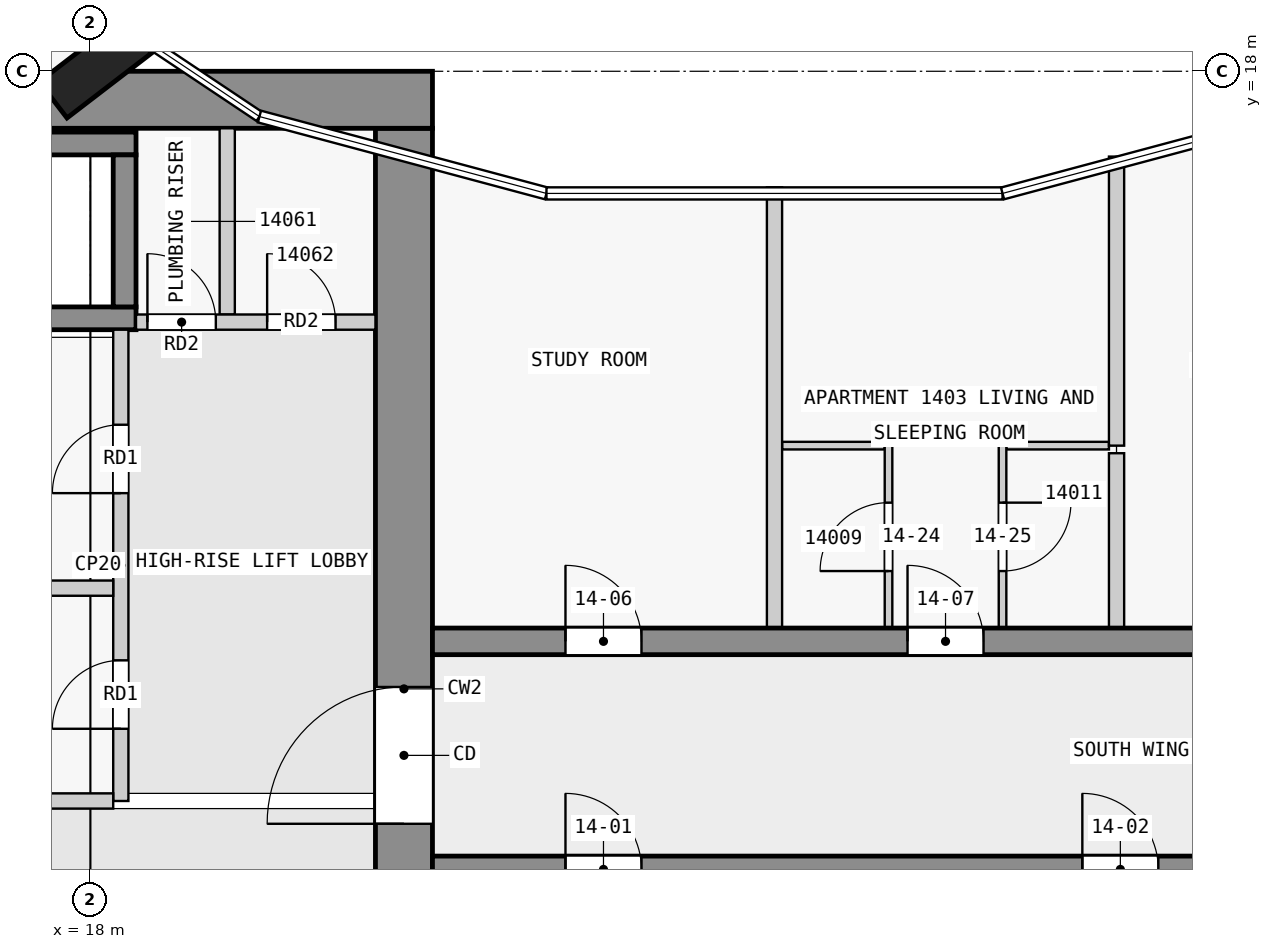
"""IFC4 building model, lengths in metres.
Left out: names, types, materials, properties, quantities, classifications, styles, units other than length and angle.
Written with IfcOpenShell. Run it as: python <this file> out.ifc"""

import sys

from ifc_helpers import new_model, si_unit, direction, frame, frame_2d, origin, origin_2d, place, context, subcontext, project, spatial, rectangle, extrude, element, fill, save


model = new_model("IFC4")
c1 = context("Model", 3, precision=1e-05, world=origin(), true_north=direction((0.0, 1.0)))
c2 = subcontext(c1, "Body", "Model", "MODEL_VIEW")
j1 = project(units=[si_unit("LENGTHUNIT", "METRE"), si_unit("PLANEANGLEUNIT", "RADIAN")], contexts=[c1])
p1 = place(None, origin())
s1 = spatial("IfcSite", under=j1, at=p1, CompositionType="ELEMENT")
p2 = place(p1, origin())
s2 = spatial("IfcBuilding", under=s1, at=p2, CompositionType="ELEMENT")
p3 = place(p2, frame((0.0, 0.0, 58.3)))
s3 = spatial("IfcBuildingStorey", under=s2, at=p3, CompositionType="ELEMENT", Elevation=58.3)
p4 = place(p3, frame((18.065, 18.05, 0.0), z_axis=(0.0, 0.0, 1.0), x_axis=(-0.608810846443, 0.793315418515, 0.0)))
e1 = element("IfcColumn", 1, at=p4, inside=s3, PredefinedType="COLUMN", context=c2, shape_type="SweptSolid", body=[
    extrude(rectangle(XDim=0.6, YDim=1.4, at=origin_2d()), origin(), (0.0, 0.0, 1.0), 3.5),
])
p5 = place(p3, frame((1.55, 17.625, 0.0), z_axis=(0.0, 0.0, 1.0), x_axis=(1.0, 0.0, 0.0)))
e2 = element("IfcWall", 2, at=p5, inside=s3, PredefinedType="SHEAR", context=c2, shape_type="SweptSolid", body=[
    extrude(rectangle(XDim=20.95, YDim=0.75, at=frame_2d((10.475, 0.0))), origin(), (0.0, 0.0, 1.0), 3.25),
])
p6 = place(p5, frame((6.55, 0.0, 0.0)))
e3 = element("IfcOpeningElement", 3, at=p6, cuts=e2, PredefinedType="OPENING", context=c2, shape_type="SweptSolid", body=[
    extrude(rectangle(XDim=1.8, YDim=2.1, at=frame_2d((0.9, 1.05))), frame((0.0, 0.385, 0.0), z_axis=(0.0, -1.0, 0.0), x_axis=(1.0, 0.0, 0.0)), (0.0, 0.0, 1.0), 0.77),
])
p7 = place(p3, frame((22.125, 2.5, 0.0), z_axis=(0.0, 0.0, 1.0), x_axis=(0.0, 1.0, 0.0)))
e4 = element("IfcWall", 4, at=p7, inside=s3, PredefinedType="SHEAR", context=c2, shape_type="SweptSolid", body=[
    extrude(rectangle(XDim=14.75, YDim=0.75, at=frame_2d((7.375, 0.0))), origin(), (0.0, 0.0, 1.0), 3.25),
])
p8 = place(p7, frame((5.6, 0.0, 0.0)))
e5 = element("IfcOpeningElement", 5, at=p8, cuts=e4, PredefinedType="OPENING", context=c2, shape_type="SweptSolid", body=[
    extrude(rectangle(XDim=1.8, YDim=2.1, at=frame_2d((0.9, 1.05))), frame((0.0, 0.385, 0.0), z_axis=(0.0, -1.0, 0.0), x_axis=(1.0, 0.0, 0.0)), (0.0, 0.0, 1.0), 0.77),
])
for number, where, z_axis, x_axis in (
    (6, (10.8, 17.05, 0.0), (0.0, 0.0, 1.0), (1.0, 0.0, 0.0)),
    (7, (10.8, 14.75, 0.0), (0.0, 0.0, 1.0), (1.0, 0.0, 0.0)),
):
    element("IfcWall", number, at=place(p3, frame(where, z_axis=z_axis, x_axis=x_axis)), inside=s3, PredefinedType="SHEAR", context=c2, shape_type="SweptSolid", body=[
        extrude(rectangle(XDim=7.8, YDim=0.3, at=frame_2d((3.9, 0.0))), origin(), (0.0, 0.0, 1.0), 3.25),
    ])
p9 = place(p3, frame((18.45, 14.9, 0.0), z_axis=(0.0, 0.0, 1.0), x_axis=(0.0, 1.0, 0.0)))
e8 = element("IfcWall", 8, at=p9, inside=s3, PredefinedType="SHEAR", context=c2, shape_type="SweptSolid", body=[
    extrude(rectangle(XDim=2.0, YDim=0.3, at=frame_2d((1.0, 0.0))), origin(), (0.0, 0.0, 1.0), 3.25),
])
p10 = place(p3, frame((22.5, 7.5, 0.0), z_axis=(0.0, 0.0, 1.0), x_axis=(1.0, 0.0, 0.0)))
e9 = element("IfcWall", 9, at=p10, inside=s3, PredefinedType="SHEAR", context=c2, shape_type="SweptSolid", body=[
    extrude(rectangle(XDim=22.5, YDim=0.35, at=frame_2d((11.25, 0.0))), origin(), (0.0, 0.0, 1.0), 3.25),
])
p11 = place(p10, frame((1.75, 0.0, 0.0)))
e10 = element("IfcOpeningElement", 10, at=p11, cuts=e9, PredefinedType="OPENING", context=c2, shape_type="SweptSolid", body=[
    extrude(rectangle(XDim=1.0, YDim=2.1, at=frame_2d((0.5, 1.05))), frame((0.0, 0.185, 0.0), z_axis=(0.0, -1.0, 0.0), x_axis=(1.0, 0.0, 0.0)), (0.0, 0.0, 1.0), 0.37),
])
p12 = place(p10, frame((8.55, 0.0, 0.0)))
e11 = element("IfcOpeningElement", 11, at=p12, cuts=e9, PredefinedType="OPENING", context=c2, shape_type="SweptSolid", body=[
    extrude(rectangle(XDim=1.0, YDim=2.1, at=frame_2d((0.5, 1.05))), frame((0.0, 0.185, 0.0), z_axis=(0.0, -1.0, 0.0), x_axis=(1.0, 0.0, 0.0)), (0.0, 0.0, 1.0), 0.37),
])
p13 = place(p10, frame((15.25, 0.0, 0.0)))
e12 = element("IfcOpeningElement", 12, at=p13, cuts=e9, PredefinedType="OPENING", context=c2, shape_type="SweptSolid", body=[
    extrude(rectangle(XDim=1.0, YDim=2.1, at=frame_2d((0.5, 1.05))), frame((0.0, 0.185, 0.0), z_axis=(0.0, -1.0, 0.0), x_axis=(1.0, 0.0, 0.0)), (0.0, 0.0, 1.0), 0.37),
])
p14 = place(p10, frame((18.75, 0.0, 0.0)))
e13 = element("IfcOpeningElement", 13, at=p14, cuts=e9, PredefinedType="OPENING", context=c2, shape_type="SweptSolid", body=[
    extrude(rectangle(XDim=0.9, YDim=2.1, at=frame_2d((0.45, 1.05))), frame((0.0, 0.185, 0.0), z_axis=(0.0, -1.0, 0.0), x_axis=(1.0, 0.0, 0.0)), (0.0, 0.0, 1.0), 0.37),
])
p15 = place(p10, frame((20.95, 0.0, 0.0)))
e14 = element("IfcOpeningElement", 14, at=p15, cuts=e9, PredefinedType="OPENING", context=c2, shape_type="SweptSolid", body=[
    extrude(rectangle(XDim=1.0, YDim=2.1, at=frame_2d((0.5, 1.05))), frame((0.0, 0.185, 0.0), z_axis=(0.0, -1.0, 0.0), x_axis=(1.0, 0.0, 0.0)), (0.0, 0.0, 1.0), 0.37),
])
p16 = place(p3, frame((22.5, 10.5, 0.0), z_axis=(0.0, 0.0, 1.0), x_axis=(1.0, 0.0, 0.0)))
e15 = element("IfcWall", 15, at=p16, inside=s3, PredefinedType="SHEAR", context=c2, shape_type="SweptSolid", body=[
    extrude(rectangle(XDim=22.5, YDim=0.35, at=frame_2d((11.25, 0.0))), origin(), (0.0, 0.0, 1.0), 3.25),
])
p17 = place(p16, frame((1.75, 0.0, 0.0)))
e16 = element("IfcOpeningElement", 16, at=p17, cuts=e15, PredefinedType="OPENING", context=c2, shape_type="SweptSolid", body=[
    extrude(rectangle(XDim=1.0, YDim=2.1, at=frame_2d((0.5, 1.05))), frame((0.0, 0.185, 0.0), z_axis=(0.0, -1.0, 0.0), x_axis=(1.0, 0.0, 0.0)), (0.0, 0.0, 1.0), 0.37),
])
p18 = place(p16, frame((6.25, 0.0, 0.0)))
e17 = element("IfcOpeningElement", 17, at=p18, cuts=e15, PredefinedType="OPENING", context=c2, shape_type="SweptSolid", body=[
    extrude(rectangle(XDim=1.0, YDim=2.1, at=frame_2d((0.5, 1.05))), frame((0.0, 0.185, 0.0), z_axis=(0.0, -1.0, 0.0), x_axis=(1.0, 0.0, 0.0)), (0.0, 0.0, 1.0), 0.37),
])
p19 = place(p16, frame((10.75, 0.0, 0.0)))
e18 = element("IfcOpeningElement", 18, at=p19, cuts=e15, PredefinedType="OPENING", context=c2, shape_type="SweptSolid", body=[
    extrude(rectangle(XDim=1.0, YDim=2.1, at=frame_2d((0.5, 1.05))), frame((0.0, 0.185, 0.0), z_axis=(0.0, -1.0, 0.0), x_axis=(1.0, 0.0, 0.0)), (0.0, 0.0, 1.0), 0.37),
])
p20 = place(p16, frame((16.85, 0.0, 0.0)))
e19 = element("IfcOpeningElement", 19, at=p20, cuts=e15, PredefinedType="OPENING", context=c2, shape_type="SweptSolid", body=[
    extrude(rectangle(XDim=1.0, YDim=2.1, at=frame_2d((0.5, 1.05))), frame((0.0, 0.185, 0.0), z_axis=(0.0, -1.0, 0.0), x_axis=(1.0, 0.0, 0.0)), (0.0, 0.0, 1.0), 0.37),
])
p21 = place(p3, frame((10.9, 8.4, 0.0), z_axis=(0.0, 0.0, 1.0), x_axis=(1.0, 0.0, 0.0)))
e20 = element("IfcWall", 20, at=p21, inside=s3, PredefinedType="PARTITIONING", context=c2, shape_type="SweptSolid", body=[
    extrude(rectangle(XDim=7.4, YDim=0.2, at=frame_2d((3.7, 0.0))), origin(), (0.0, 0.0, 1.0), 3.25),
])
p22 = place(p3, frame((18.4, 8.4, 0.0), z_axis=(0.0, 0.0, 1.0), x_axis=(0.0, 1.0, 0.0)))
e21 = element("IfcWall", 21, at=p22, inside=s3, PredefinedType="PARTITIONING", context=c2, shape_type="SweptSolid", body=[
    extrude(rectangle(XDim=6.2, YDim=0.2, at=frame_2d((3.1, 0.0))), origin(), (0.0, 0.0, 1.0), 3.25),
])
p23 = place(p22, frame((0.95, 0.0, 0.0)))
e22 = element("IfcOpeningElement", 22, at=p23, cuts=e21, PredefinedType="OPENING", context=c2, shape_type="SweptSolid", body=[
    extrude(rectangle(XDim=0.9, YDim=2.1, at=frame_2d((0.45, 1.05))), frame((0.0, 0.11, 0.0), z_axis=(0.0, -1.0, 0.0), x_axis=(1.0, 0.0, 0.0)), (0.0, 0.0, 1.0), 0.22),
])
p24 = place(p22, frame((4.05, 0.0, 0.0)))
e23 = element("IfcOpeningElement", 23, at=p24, cuts=e21, PredefinedType="OPENING", context=c2, shape_type="SweptSolid", body=[
    extrude(rectangle(XDim=0.9, YDim=2.1, at=frame_2d((0.45, 1.05))), frame((0.0, 0.11, 0.0), z_axis=(0.0, -1.0, 0.0), x_axis=(1.0, 0.0, 0.0)), (0.0, 0.0, 1.0), 0.22),
])
p25 = place(p3, frame((10.9, 11.2, 0.0), z_axis=(0.0, 0.0, 1.0), x_axis=(1.0, 0.0, 0.0)))
e24 = element("IfcWall", 24, at=p25, inside=s3, PredefinedType="PARTITIONING", context=c2, shape_type="SweptSolid", body=[
    extrude(rectangle(XDim=7.4, YDim=0.2, at=frame_2d((3.7, 0.0))), origin(), (0.0, 0.0, 1.0), 3.25),
])
p26 = place(p3, frame((18.6, 14.7, 0.0), z_axis=(0.0, 0.0, 1.0), x_axis=(1.0, 0.0, 0.0)))
e25 = element("IfcWall", 25, at=p26, inside=s3, PredefinedType="PARTITIONING", context=c2, shape_type="SweptSolid", body=[
    extrude(rectangle(XDim=3.15, YDim=0.2, at=frame_2d((1.575, 0.0))), origin(), (0.0, 0.0, 1.0), 3.25),
])
p27 = place(p26, frame((0.15, 0.0, 0.0)))
e26 = element("IfcOpeningElement", 26, at=p27, cuts=e25, PredefinedType="OPENING", context=c2, shape_type="SweptSolid", body=[
    extrude(rectangle(XDim=0.9, YDim=2.1, at=frame_2d((0.45, 1.05))), frame((0.0, 0.11, 0.0), z_axis=(0.0, -1.0, 0.0), x_axis=(1.0, 0.0, 0.0)), (0.0, 0.0, 1.0), 0.22),
])
p28 = place(p26, frame((1.725, 0.0, 0.0)))
e27 = element("IfcOpeningElement", 27, at=p28, cuts=e25, PredefinedType="OPENING", context=c2, shape_type="SweptSolid", body=[
    extrude(rectangle(XDim=0.9, YDim=2.1, at=frame_2d((0.45, 1.05))), frame((0.0, 0.11, 0.0), z_axis=(0.0, -1.0, 0.0), x_axis=(1.0, 0.0, 0.0)), (0.0, 0.0, 1.0), 0.22),
])
p29 = place(p3, frame((19.8, 14.8, 0.0), z_axis=(0.0, 0.0, 1.0), x_axis=(0.0, 1.0, 0.0)))
e28 = element("IfcWall", 28, at=p29, inside=s3, PredefinedType="PARTITIONING", context=c2, shape_type="SweptSolid", body=[
    extrude(rectangle(XDim=2.45, YDim=0.2, at=frame_2d((1.225, 0.0))), origin(), (0.0, 0.0, 1.0), 3.25),
])
for number, where, z_axis, x_axis in (
    (29, (28.45, 13.075, 0.0), (0.0, 0.0, 1.0), (-1.0, 0.0, 0.0)),
    (30, (31.4, 13.075, 0.0), (0.0, 0.0, 1.0), (-1.0, 0.0, 0.0)),
):
    element("IfcWall", number, at=place(p3, frame(where, z_axis=z_axis, x_axis=x_axis)), inside=s3, PredefinedType="PARTITIONING", context=c2, shape_type="SweptSolid", body=[
        extrude(rectangle(XDim=1.35, YDim=0.1, at=frame_2d((0.675, 0.0))), origin(), (0.0, 0.0, 1.0), 3.25),
    ])
p30 = place(p3, frame((27.0, 10.675, 0.0), z_axis=(0.0, 0.0, 1.0), x_axis=(0.0, 1.0, 0.0)))
e31 = element("IfcWall", 31, at=p30, inside=s3, PredefinedType="PARTITIONING", context=c2, shape_type="SweptSolid", body=[
    extrude(rectangle(XDim=5.798, YDim=0.2, at=frame_2d((2.899, 0.0))), origin(), (0.0, 0.0, 1.0), 3.25),
])
p31 = place(p3, frame((28.5, 10.675, 0.0), z_axis=(0.0, 0.0, 1.0), x_axis=(0.0, 1.0, 0.0)))
e32 = element("IfcWall", 32, at=p31, inside=s3, PredefinedType="PARTITIONING", context=c2, shape_type="SweptSolid", body=[
    extrude(rectangle(XDim=2.4, YDim=0.1, at=frame_2d((1.2, 0.0))), origin(), (0.0, 0.0, 1.0), 3.25),
])
p32 = place(p31, frame((0.75, 0.0, 0.0)))
e33 = element("IfcOpeningElement", 33, at=p32, cuts=e32, PredefinedType="OPENING", context=c2, shape_type="SweptSolid", body=[
    extrude(rectangle(XDim=0.9, YDim=2.1, at=frame_2d((0.45, 1.05))), frame((0.0, 0.06, 0.0), z_axis=(0.0, -1.0, 0.0), x_axis=(1.0, 0.0, 0.0)), (0.0, 0.0, 1.0), 0.12),
])
p33 = place(p3, frame((30.0, 13.075, 0.0), z_axis=(0.0, 0.0, 1.0), x_axis=(0.0, -1.0, 0.0)))
e34 = element("IfcWall", 34, at=p33, inside=s3, PredefinedType="PARTITIONING", context=c2, shape_type="SweptSolid", body=[
    extrude(rectangle(XDim=2.4, YDim=0.1, at=frame_2d((1.2, 0.0))), origin(), (0.0, 0.0, 1.0), 3.25),
])
p34 = place(p33, frame((0.75, 0.0, 0.0)))
e35 = element("IfcOpeningElement", 35, at=p34, cuts=e34, PredefinedType="OPENING", context=c2, shape_type="SweptSolid", body=[
    extrude(rectangle(XDim=0.9, YDim=2.1, at=frame_2d((0.45, 1.05))), frame((0.0, 0.06, 0.0), z_axis=(0.0, -1.0, 0.0), x_axis=(1.0, 0.0, 0.0)), (0.0, 0.0, 1.0), 0.12),
])
p35 = place(p3, frame((31.5, 16.878, 0.0), z_axis=(0.0, 0.0, 1.0), x_axis=(0.0, -1.0, 0.0)))
e36 = element("IfcWall", 36, at=p35, inside=s3, PredefinedType="PARTITIONING", context=c2, shape_type="SweptSolid", body=[
    extrude(rectangle(XDim=3.803, YDim=0.2, at=frame_2d((1.901, 0.0))), origin(), (0.0, 0.0, 1.0), 3.25),
])
p36 = place(p3, frame((31.5, 10.675, 0.0), z_axis=(0.0, 0.0, 1.0), x_axis=(0.0, 1.0, 0.0)))
e37 = element("IfcWall", 37, at=p36, inside=s3, PredefinedType="PARTITIONING", context=c2, shape_type="SweptSolid", body=[
    extrude(rectangle(XDim=2.3, YDim=0.2, at=frame_2d((1.15, 0.0))), origin(), (0.0, 0.0, 1.0), 3.25),
])
p37 = place(p23, origin())
e38 = element("IfcDoor", 38, at=p37, inside=s3, OperationType="SINGLE_SWING_LEFT", PredefinedType="DOOR", context=c2, shape_type="SweptSolid", body=[
    extrude(rectangle(XDim=0.9, YDim=2.1, at=frame_2d((0.45, 1.05))), frame((0.0, 0.025, 0.0), z_axis=(0.0, -1.0, 0.0), x_axis=(1.0, 0.0, 0.0)), (0.0, 0.0, 1.0), 0.05),
])
fill(e22, e38)
p38 = place(p24, origin())
e39 = element("IfcDoor", 39, at=p38, inside=s3, OperationType="SINGLE_SWING_LEFT", PredefinedType="DOOR", context=c2, shape_type="SweptSolid", body=[
    extrude(rectangle(XDim=0.9, YDim=2.1, at=frame_2d((0.45, 1.05))), frame((0.0, 0.025, 0.0), z_axis=(0.0, -1.0, 0.0), x_axis=(1.0, 0.0, 0.0)), (0.0, 0.0, 1.0), 0.05),
])
fill(e23, e39)
p39 = place(p8, origin())
e40 = element("IfcDoor", 40, at=p39, inside=s3, OperationType="DOUBLE_DOOR_SINGLE_SWING", PredefinedType="DOOR", context=c2, shape_type="SweptSolid", body=[
    extrude(rectangle(XDim=1.8, YDim=2.1, at=frame_2d((0.9, 1.05))), frame((0.0, 0.025, 0.0), z_axis=(0.0, -1.0, 0.0), x_axis=(1.0, 0.0, 0.0)), (0.0, 0.0, 1.0), 0.05),
])
fill(e5, e40)
p40 = place(p27, origin())
e41 = element("IfcDoor", 41, at=p40, inside=s3, OperationType="SINGLE_SWING_LEFT", PredefinedType="DOOR", context=c2, shape_type="SweptSolid", body=[
    extrude(rectangle(XDim=0.9, YDim=2.1, at=frame_2d((0.45, 1.05))), frame((0.0, 0.025, 0.0), z_axis=(0.0, -1.0, 0.0), x_axis=(1.0, 0.0, 0.0)), (0.0, 0.0, 1.0), 0.05),
])
fill(e26, e41)
p41 = place(p28, origin())
e42 = element("IfcDoor", 42, at=p41, inside=s3, OperationType="SINGLE_SWING_LEFT", PredefinedType="DOOR", context=c2, shape_type="SweptSolid", body=[
    extrude(rectangle(XDim=0.9, YDim=2.1, at=frame_2d((0.45, 1.05))), frame((0.0, 0.025, 0.0), z_axis=(0.0, -1.0, 0.0), x_axis=(1.0, 0.0, 0.0)), (0.0, 0.0, 1.0), 0.05),
])
fill(e27, e42)
p42 = place(p11, origin())
e43 = element("IfcDoor", 43, at=p42, inside=s3, OperationType="SINGLE_SWING_LEFT", PredefinedType="DOOR", context=c2, shape_type="SweptSolid", body=[
    extrude(rectangle(XDim=1.0, YDim=2.1, at=frame_2d((0.5, 1.05))), frame((0.0, 0.025, 0.0), z_axis=(0.0, -1.0, 0.0), x_axis=(1.0, 0.0, 0.0)), (0.0, 0.0, 1.0), 0.05),
])
fill(e10, e43)
p43 = place(p12, origin())
e44 = element("IfcDoor", 44, at=p43, inside=s3, OperationType="SINGLE_SWING_LEFT", PredefinedType="DOOR", context=c2, shape_type="SweptSolid", body=[
    extrude(rectangle(XDim=1.0, YDim=2.1, at=frame_2d((0.5, 1.05))), frame((0.0, 0.025, 0.0), z_axis=(0.0, -1.0, 0.0), x_axis=(1.0, 0.0, 0.0)), (0.0, 0.0, 1.0), 0.05),
])
fill(e11, e44)
p44 = place(p17, origin())
e45 = element("IfcDoor", 45, at=p44, inside=s3, OperationType="SINGLE_SWING_LEFT", PredefinedType="DOOR", context=c2, shape_type="SweptSolid", body=[
    extrude(rectangle(XDim=1.0, YDim=2.1, at=frame_2d((0.5, 1.05))), frame((0.0, 0.025, 0.0), z_axis=(0.0, -1.0, 0.0), x_axis=(1.0, 0.0, 0.0)), (0.0, 0.0, 1.0), 0.05),
])
fill(e16, e45)
p45 = place(p18, origin())
e46 = element("IfcDoor", 46, at=p45, inside=s3, OperationType="SINGLE_SWING_LEFT", PredefinedType="DOOR", context=c2, shape_type="SweptSolid", body=[
    extrude(rectangle(XDim=1.0, YDim=2.1, at=frame_2d((0.5, 1.05))), frame((0.0, 0.025, 0.0), z_axis=(0.0, -1.0, 0.0), x_axis=(1.0, 0.0, 0.0)), (0.0, 0.0, 1.0), 0.05),
])
fill(e17, e46)
p46 = place(p32, origin())
e47 = element("IfcDoor", 47, at=p46, inside=s3, OperationType="SINGLE_SWING_RIGHT", PredefinedType="DOOR", context=c2, shape_type="SweptSolid", body=[
    extrude(rectangle(XDim=0.9, YDim=2.1, at=frame_2d((0.45, 1.05))), frame((0.0, 0.025, 0.0), z_axis=(0.0, -1.0, 0.0), x_axis=(1.0, 0.0, 0.0)), (0.0, 0.0, 1.0), 0.05),
])
fill(e33, e47)
p47 = place(p34, origin())
e48 = element("IfcDoor", 48, at=p47, inside=s3, OperationType="SINGLE_SWING_RIGHT", PredefinedType="DOOR", context=c2, shape_type="SweptSolid", body=[
    extrude(rectangle(XDim=0.9, YDim=2.1, at=frame_2d((0.45, 1.05))), frame((0.0, 0.025, 0.0), z_axis=(0.0, -1.0, 0.0), x_axis=(1.0, 0.0, 0.0)), (0.0, 0.0, 1.0), 0.05),
])
fill(e35, e48)
save(model, sys.argv[1])
